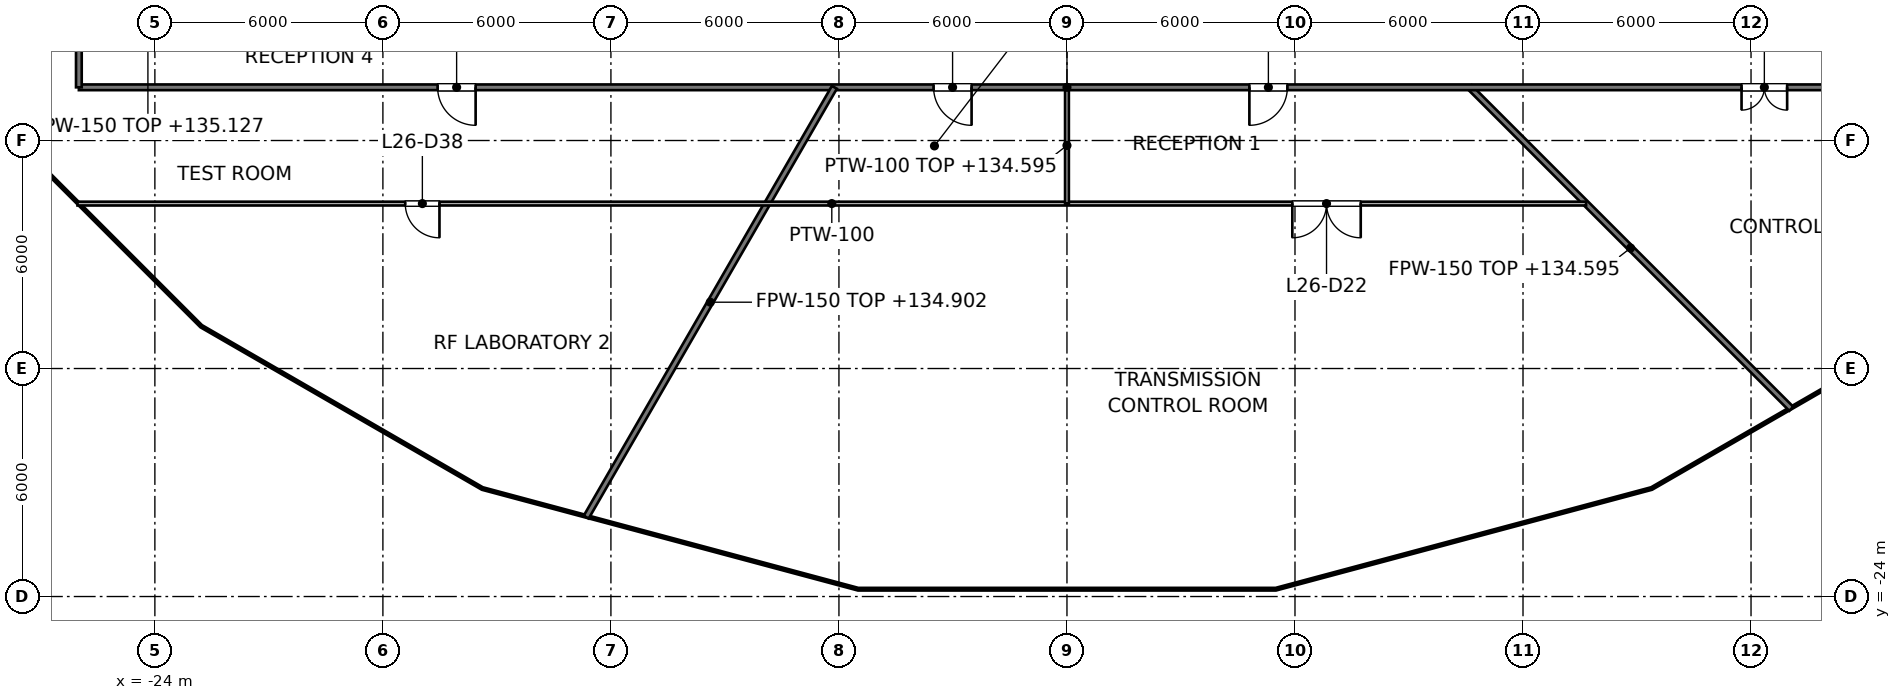
"""IFC4 building model, lengths in metres.
Left out: names, types, materials, properties, quantities, classifications, styles, units other than length and angle.
Written with IfcOpenShell. Run it as: python <this file> out.ifc"""

import sys

from ifc_helpers import new_model, si_unit, direction, frame, frame_2d, origin, place, context, subcontext, project, spatial, rectangle, extrude, element, fill, save


model = new_model("IFC4")
c1 = context("Model", 3, precision=1e-05, world=origin(), true_north=direction((0.0, 1.0)))
c2 = subcontext(c1, "Body", "Model", "MODEL_VIEW")
j1 = project(units=[si_unit("LENGTHUNIT", "METRE"), si_unit("PLANEANGLEUNIT", "RADIAN")], contexts=[c1])
p1 = place(None, origin())
s1 = spatial("IfcSite", under=j1, at=p1, CompositionType="ELEMENT")
p2 = place(p1, origin())
s2 = spatial("IfcBuilding", under=s1, at=p2, CompositionType="ELEMENT")
p3 = place(p2, frame((0.0, 0.0, 131.4)))
s3 = spatial("IfcBuildingStorey", under=s2, at=p3, CompositionType="ELEMENT", Elevation=131.4)
p4 = place(p3, frame((10.6, -10.6, 0.0), z_axis=(0.0, 0.0, 1.0), x_axis=(0.707106781187, -0.707106781187, 0.0)))
e1 = element("IfcWall", 1, at=p4, inside=s3, PredefinedType="PARTITIONING", context=c2, shape_type="SweptSolid", body=[
    extrude(rectangle(XDim=11.963, YDim=0.15, at=frame_2d((5.981, 0.0))), origin(), (0.0, 0.0, 1.0), 3.195),
])
p5 = place(p3, frame((-26.0, -10.6, 0.0), z_axis=(0.0, 0.0, 1.0), x_axis=(1.0, 0.0, 0.0)))
e2 = element("IfcWall", 2, at=p5, inside=s3, PredefinedType="PARTITIONING", context=c2, shape_type="SweptSolid", body=[
    extrude(rectangle(XDim=52.0, YDim=0.15, at=frame_2d((26.0, 0.0))), origin(), (0.0, 0.0, 1.0), 3.127),
])
p6 = place(p5, frame((22.49, 0.0, 0.0)))
e3 = element("IfcOpeningElement", 3, at=p6, cuts=e2, PredefinedType="OPENING", context=c2, shape_type="SweptSolid", body=[
    extrude(rectangle(XDim=1.0, YDim=2.1, at=frame_2d((0.5, 1.05))), frame((0.0, 0.075, 0.0), z_axis=(0.0, -1.0, 0.0), x_axis=(1.0, 0.0, 0.0)), (0.0, 0.0, 1.0), 0.15),
])
p7 = place(p5, frame((30.8, 0.0, 0.0)))
e4 = element("IfcOpeningElement", 4, at=p7, cuts=e2, PredefinedType="OPENING", context=c2, shape_type="SweptSolid", body=[
    extrude(rectangle(XDim=1.0, YDim=2.1, at=frame_2d((0.5, 1.05))), frame((0.0, 0.075, 0.0), z_axis=(0.0, -1.0, 0.0), x_axis=(1.0, 0.0, 0.0)), (0.0, 0.0, 1.0), 0.15),
])
p8 = place(p5, frame((43.75, 0.0, 0.0)))
e5 = element("IfcOpeningElement", 5, at=p8, cuts=e2, PredefinedType="OPENING", context=c2, shape_type="SweptSolid", body=[
    extrude(rectangle(XDim=1.2, YDim=2.1, at=frame_2d((0.6, 1.05))), frame((0.0, 0.075, 0.0), z_axis=(0.0, -1.0, 0.0), x_axis=(1.0, 0.0, 0.0)), (0.0, 0.0, 1.0), 0.15),
])
p9 = place(p5, frame((9.44, 0.0, 0.0)))
e6 = element("IfcOpeningElement", 6, at=p9, cuts=e2, PredefinedType="OPENING", context=c2, shape_type="SweptSolid", body=[
    extrude(rectangle(XDim=1.0, YDim=2.1, at=frame_2d((0.5, 1.05))), frame((0.0, 0.075, 0.0), z_axis=(0.0, -1.0, 0.0), x_axis=(1.0, 0.0, 0.0)), (0.0, 0.0, 1.0), 0.15),
])
p10 = place(p3, frame((-12.65, -21.91, 0.0), z_axis=(0.0, 0.0, 1.0), x_axis=(0.500017508733, 0.866015294877, 0.0)))
e7 = element("IfcWall", 7, at=p10, inside=s3, PredefinedType="PARTITIONING", context=c2, shape_type="SweptSolid", body=[
    extrude(rectangle(XDim=13.06, YDim=0.15, at=frame_2d((6.53, 0.0))), origin(), (0.0, 0.0, 1.0), 3.502),
])
p11 = place(p3, frame((-26.0, -10.6, 0.0), z_axis=(0.0, 0.0, 1.0), x_axis=(0.0, 1.0, 0.0)))
e8 = element("IfcWall", 8, at=p11, inside=s3, PredefinedType="PARTITIONING", context=c2, shape_type="SweptSolid", body=[
    extrude(rectangle(XDim=2.8, YDim=0.15, at=frame_2d((1.4, 0.0))), origin(), (0.0, 0.0, 1.0), 3.276),
])
p12 = place(p3, frame((-26.036, -13.66, 0.0), z_axis=(0.0, 0.0, 1.0), x_axis=(1.0, 0.0, 0.0)))
e9 = element("IfcWall", 9, at=p12, inside=s3, PredefinedType="PARTITIONING", context=c2, shape_type="SweptSolid", body=[
    extrude(rectangle(XDim=39.696, YDim=0.1, at=frame_2d((19.848, 0.0))), origin(), (0.0, 0.0, 1.0), 3.127),
])
p13 = place(p12, frame((31.966, 0.0, 0.0)))
e10 = element("IfcOpeningElement", 10, at=p13, cuts=e9, PredefinedType="OPENING", context=c2, shape_type="SweptSolid", body=[
    extrude(rectangle(XDim=1.8, YDim=2.1, at=frame_2d((0.9, 1.05))), frame((0.0, 0.05, 0.0), z_axis=(0.0, -1.0, 0.0), x_axis=(1.0, 0.0, 0.0)), (0.0, 0.0, 1.0), 0.1),
])
p14 = place(p12, frame((8.625, 0.0, 0.0)))
e11 = element("IfcOpeningElement", 11, at=p14, cuts=e9, PredefinedType="OPENING", context=c2, shape_type="SweptSolid", body=[
    extrude(rectangle(XDim=0.9, YDim=2.1, at=frame_2d((0.45, 1.05))), frame((0.0, 0.05, 0.0), z_axis=(0.0, -1.0, 0.0), x_axis=(1.0, 0.0, 0.0)), (0.0, 0.0, 1.0), 0.1),
])
p15 = place(p3, frame((0.0, -13.66, 0.0), z_axis=(0.0, 0.0, 1.0), x_axis=(0.0, 1.0, 0.0)))
e12 = element("IfcWall", 12, at=p15, inside=s3, PredefinedType="PARTITIONING", context=c2, shape_type="SweptSolid", body=[
    extrude(rectangle(XDim=3.06, YDim=0.1, at=frame_2d((1.53, 0.0))), origin(), (0.0, 0.0, 1.0), 3.195),
])
p16 = place(p6, origin())
e13 = element("IfcDoor", 13, at=p16, inside=s3, OperationType="SINGLE_SWING_RIGHT", PredefinedType="DOOR", context=c2, shape_type="SweptSolid", body=[
    extrude(rectangle(XDim=1.0, YDim=2.1, at=frame_2d((0.5, 1.05))), frame((0.0, 0.025, 0.0), z_axis=(0.0, -1.0, 0.0), x_axis=(1.0, 0.0, 0.0)), (0.0, 0.0, 1.0), 0.05),
])
fill(e3, e13)
p17 = place(p7, origin())
e14 = element("IfcDoor", 14, at=p17, inside=s3, OperationType="SINGLE_SWING_LEFT", PredefinedType="DOOR", context=c2, shape_type="SweptSolid", body=[
    extrude(rectangle(XDim=1.0, YDim=2.1, at=frame_2d((0.5, 1.05))), frame((0.0, 0.025, 0.0), z_axis=(0.0, -1.0, 0.0), x_axis=(1.0, 0.0, 0.0)), (0.0, 0.0, 1.0), 0.05),
])
fill(e4, e14)
p18 = place(p13, origin())
e15 = element("IfcDoor", 15, at=p18, inside=s3, OperationType="DOUBLE_DOOR_SINGLE_SWING", PredefinedType="DOOR", context=c2, shape_type="SweptSolid", body=[
    extrude(rectangle(XDim=1.8, YDim=2.1, at=frame_2d((0.9, 1.05))), frame((0.0, 0.025, 0.0), z_axis=(0.0, -1.0, 0.0), x_axis=(1.0, 0.0, 0.0)), (0.0, 0.0, 1.0), 0.05),
])
fill(e10, e15)
p19 = place(p8, origin())
e16 = element("IfcDoor", 16, at=p19, inside=s3, OperationType="DOUBLE_DOOR_SINGLE_SWING", PredefinedType="DOOR", context=c2, shape_type="SweptSolid", body=[
    extrude(rectangle(XDim=1.2, YDim=2.1, at=frame_2d((0.6, 1.05))), frame((0.0, 0.025, 0.0), z_axis=(0.0, -1.0, 0.0), x_axis=(1.0, 0.0, 0.0)), (0.0, 0.0, 1.0), 0.05),
])
fill(e5, e16)
p20 = place(p9, origin())
e17 = element("IfcDoor", 17, at=p20, inside=s3, OperationType="SINGLE_SWING_RIGHT", PredefinedType="DOOR", context=c2, shape_type="SweptSolid", body=[
    extrude(rectangle(XDim=1.0, YDim=2.1, at=frame_2d((0.5, 1.05))), frame((0.0, 0.025, 0.0), z_axis=(0.0, -1.0, 0.0), x_axis=(1.0, 0.0, 0.0)), (0.0, 0.0, 1.0), 0.05),
])
fill(e6, e17)
p21 = place(p14, origin())
e18 = element("IfcDoor", 18, at=p21, inside=s3, OperationType="SINGLE_SWING_RIGHT", PredefinedType="DOOR", context=c2, shape_type="SweptSolid", body=[
    extrude(rectangle(XDim=0.9, YDim=2.1, at=frame_2d((0.45, 1.05))), frame((0.0, 0.025, 0.0), z_axis=(0.0, -1.0, 0.0), x_axis=(1.0, 0.0, 0.0)), (0.0, 0.0, 1.0), 0.05),
])
fill(e11, e18)
save(model, sys.argv[1])
